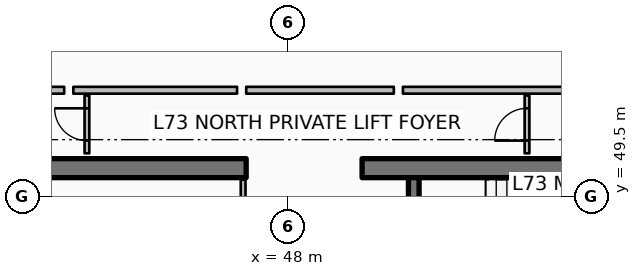
"""IFC4 building model, lengths in metres.
Left out: names, types, materials, properties, quantities, classifications, styles, units other than length and angle.
Written with IfcOpenShell. Run it as: python <this file> out.ifc"""

import sys

from ifc_helpers import new_model, si_unit, direction, frame, frame_2d, origin, place, context, subcontext, project, spatial, rectangle, extrude, element, fill, save


model = new_model("IFC4")
c1 = context("Model", 3, precision=1e-05, world=origin(), true_north=direction((0.0, 1.0)))
c2 = subcontext(c1, "Body", "Model", "MODEL_VIEW")
j1 = project(units=[si_unit("LENGTHUNIT", "METRE"), si_unit("PLANEANGLEUNIT", "RADIAN")], contexts=[c1])
p1 = place(None, origin())
s1 = spatial("IfcSite", under=j1, at=p1, CompositionType="ELEMENT")
p2 = place(p1, origin())
s2 = spatial("IfcBuilding", under=s1, at=p2, CompositionType="ELEMENT")
p3 = place(p2, frame((0.0, 0.0, 290.6)))
s3 = spatial("IfcBuildingStorey", under=s2, at=p3, CompositionType="ELEMENT", Elevation=290.6)
p4 = place(p3, frame((37.3, 50.25, 0.0), z_axis=(0.0, 0.0, 1.0), x_axis=(1.0, 0.0, 0.0)))
e1 = element("IfcWall", 1, at=p4, inside=s3, PredefinedType="SHEAR", context=c2, shape_type="SweptSolid", body=[
    extrude(rectangle(XDim=9.6, YDim=0.5, at=frame_2d((4.8, 0.0))), origin(), (0.0, 0.0, 1.0), 3.85),
])
p5 = place(p3, frame((49.95, 50.25, 0.0), z_axis=(0.0, 0.0, 1.0), x_axis=(1.0, 0.0, 0.0)))
e2 = element("IfcWall", 2, at=p5, inside=s3, PredefinedType="SHEAR", context=c2, shape_type="SweptSolid", body=[
    extrude(rectangle(XDim=9.6, YDim=0.5, at=frame_2d((4.8, 0.0))), origin(), (0.0, 0.0, 1.0), 3.85),
])
p6 = place(p3, frame((51.31, 46.5, 0.0), z_axis=(0.0, 0.0, 1.0), x_axis=(0.0, 1.0, 0.0)))
e3 = element("IfcWall", 3, at=p6, inside=s3, PredefinedType="SHEAR", context=c2, shape_type="SweptSolid", body=[
    extrude(rectangle(XDim=3.5, YDim=0.28, at=frame_2d((1.75, 0.0))), origin(), (0.0, 0.0, 1.0), 3.85),
])
p7 = place(p3, frame((46.82, 47.92, 0.0), z_axis=(0.0, 0.0, 1.0), x_axis=(0.0, 1.0, 0.0)))
e4 = element("IfcWall", 4, at=p7, inside=s3, PredefinedType="PARTITIONING", context=c2, shape_type="SweptSolid", body=[
    extrude(rectangle(XDim=2.03, YDim=0.125, at=frame_2d((1.015, 0.0))), origin(), (0.0, 0.0, 1.0), 3.03),
])
p8 = place(p3, frame((42.71, 50.64, 0.0), z_axis=(0.0, 0.0, 1.0), x_axis=(0.0, 1.0, 0.0)))
e5 = element("IfcWall", 5, at=p8, inside=s3, PredefinedType="PARTITIONING", context=c2, shape_type="SweptSolid", body=[
    extrude(rectangle(XDim=1.52, YDim=0.125, at=frame_2d((0.76, 0.0))), origin(), (0.0, 0.0, 1.0), 2.957),
])
p9 = place(p8, frame((0.335, 0.0, 0.0)))
e6 = element("IfcOpeningElement", 6, at=p9, cuts=e5, PredefinedType="OPENING", context=c2, shape_type="SweptSolid", body=[
    extrude(rectangle(XDim=0.85, YDim=2.06, at=frame_2d((0.425, 1.03))), frame((0.0, 0.073, 0.0), z_axis=(0.0, -1.0, 0.0), x_axis=(1.0, 0.0, 0.0)), (0.0, 0.0, 1.0), 0.145),
])
p10 = place(p3, frame((54.29, 50.64, 0.0), z_axis=(0.0, 0.0, 1.0), x_axis=(0.0, 1.0, 0.0)))
e7 = element("IfcWall", 7, at=p10, inside=s3, PredefinedType="PARTITIONING", context=c2, shape_type="SweptSolid", body=[
    extrude(rectangle(XDim=1.52, YDim=0.125, at=frame_2d((0.76, 0.0))), origin(), (0.0, 0.0, 1.0), 3.03),
])
p11 = place(p10, frame((0.335, 0.0, 0.0)))
e8 = element("IfcOpeningElement", 8, at=p11, cuts=e7, PredefinedType="OPENING", context=c2, shape_type="SweptSolid", body=[
    extrude(rectangle(XDim=0.85, YDim=2.06, at=frame_2d((0.425, 1.03))), frame((0.0, 0.073, 0.0), z_axis=(0.0, -1.0, 0.0), x_axis=(1.0, 0.0, 0.0)), (0.0, 0.0, 1.0), 0.145),
])
p12 = place(p3, frame((56.0, 52.3, 0.0), z_axis=(0.0, 0.0, 1.0), x_axis=(-1.0, 0.0, 0.0)))
e9 = element("IfcWall", 9, at=p12, inside=s3, PredefinedType="PARTITIONING", context=c2, shape_type="SweptSolid", body=[
    extrude(rectangle(XDim=4.975, YDim=0.18, at=frame_2d((2.488, 0.0))), origin(), (0.0, 0.0, 1.0), 2.957),
])
p13 = place(p3, frame((50.785, 52.3, 0.0), z_axis=(0.0, 0.0, 1.0), x_axis=(-1.0, 0.0, 0.0)))
e10 = element("IfcWall", 10, at=p13, inside=s3, PredefinedType="PARTITIONING", context=c2, shape_type="SweptSolid", body=[
    extrude(rectangle(XDim=3.884, YDim=0.18, at=frame_2d((1.942, 0.0))), origin(), (0.0, 0.0, 1.0), 2.957),
])
p14 = place(p3, frame((46.661, 52.3, 0.0), z_axis=(0.0, 0.0, 1.0), x_axis=(-1.0, 0.0, 0.0)))
e11 = element("IfcWall", 11, at=p14, inside=s3, PredefinedType="PARTITIONING", context=c2, shape_type="SweptSolid", body=[
    extrude(rectangle(XDim=4.309, YDim=0.18, at=frame_2d((2.155, 0.0))), origin(), (0.0, 0.0, 1.0), 2.957),
])
p15 = place(p3, frame((42.112, 52.3, 0.0), z_axis=(0.0, 0.0, 1.0), x_axis=(-1.0, 0.0, 0.0)))
e12 = element("IfcWall", 12, at=p15, inside=s3, PredefinedType="PARTITIONING", context=c2, shape_type="SweptSolid", body=[
    extrude(rectangle(XDim=4.692, YDim=0.18, at=frame_2d((2.346, 0.0))), origin(), (0.0, 0.0, 1.0), 2.957),
])
p16 = place(p9, origin())
e13 = element("IfcDoor", 13, at=p16, inside=s3, OperationType="SINGLE_SWING_RIGHT", PredefinedType="DOOR", context=c2, shape_type="SweptSolid", body=[
    extrude(rectangle(XDim=0.85, YDim=2.06, at=frame_2d((0.425, 1.03))), frame((0.0, 0.025, 0.0), z_axis=(0.0, -1.0, 0.0), x_axis=(1.0, 0.0, 0.0)), (0.0, 0.0, 1.0), 0.05),
])
fill(e6, e13)
p17 = place(p11, origin())
e14 = element("IfcDoor", 14, at=p17, inside=s3, OperationType="SINGLE_SWING_LEFT", PredefinedType="DOOR", context=c2, shape_type="SweptSolid", body=[
    extrude(rectangle(XDim=0.85, YDim=2.06, at=frame_2d((0.425, 1.03))), frame((0.0, 0.025, 0.0), z_axis=(0.0, -1.0, 0.0), x_axis=(1.0, 0.0, 0.0)), (0.0, 0.0, 1.0), 0.05),
])
fill(e8, e14)
save(model, sys.argv[1])
